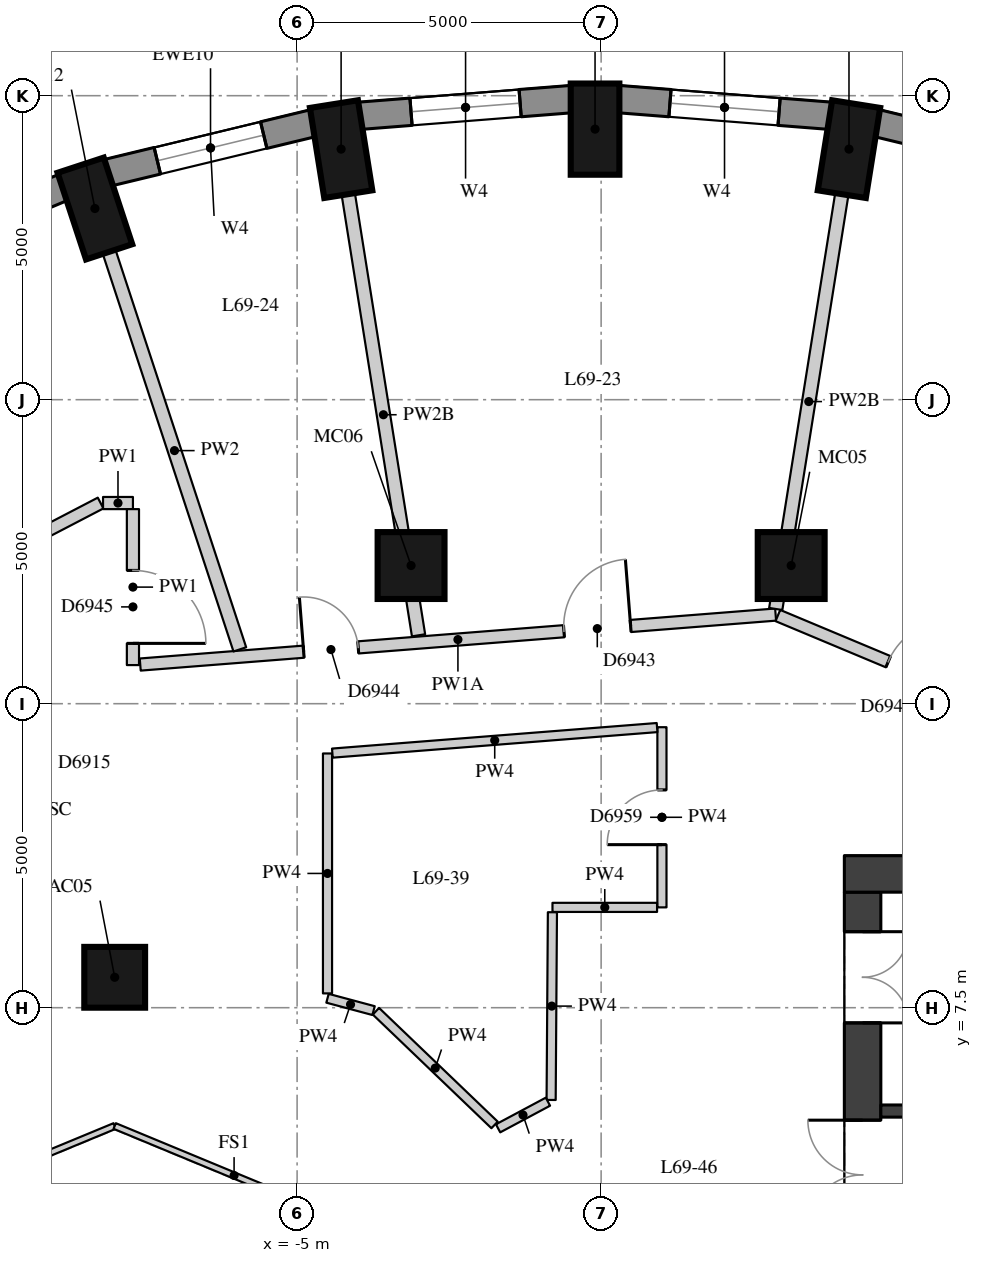
"""IFC4 building model, lengths in metres.
Left out: names, types, materials, properties, quantities, classifications, styles, units other than length and angle.
Written with IfcOpenShell. Run it as: python <this file> out.ifc"""

import sys

from ifc_helpers import new_model, si_unit, direction, frame, frame_2d, origin, origin_2d, place, context, subcontext, project, spatial, rectangle, extrude, element, fill, save


model = new_model("IFC4")
c1 = context("Model", 3, precision=1e-05, world=origin(), true_north=direction((0.0, 1.0)))
c2 = subcontext(c1, "Body", "Model", "MODEL_VIEW")
j1 = project(units=[si_unit("LENGTHUNIT", "METRE"), si_unit("PLANEANGLEUNIT", "RADIAN")], contexts=[c1])
p1 = place(None, origin())
s1 = spatial("IfcSite", under=j1, at=p1, CompositionType="ELEMENT")
p2 = place(p1, origin())
s2 = spatial("IfcBuilding", under=s1, at=p2, CompositionType="ELEMENT")
p3 = place(p2, frame((0.0, 0.0, 243.2)))
s3 = spatial("IfcBuildingStorey", under=s2, at=p3, CompositionType="ELEMENT", Elevation=243.2)
for number, where, z_axis, x_axis in (
    (1, (4.076, 21.621, 0.0), (0.0, 0.0, 1.0), (0.157, 0.988, 0.0)),
    (2, (-0.1, 21.95, 0.0), (0.0, 0.0, 1.0), (0.0, 1.0, 0.0)),
    (3, (-4.276, 21.621, 0.0), (0.0, 0.0, 1.0), (-0.157, 0.988, 0.0)),
    (4, (-8.326, 20.644, 0.0), (0.0, 0.0, 1.0), (-0.312, 0.95, 0.0)),
):
    element("IfcColumn", number, at=place(p3, frame(where, z_axis=z_axis, x_axis=x_axis)), inside=s3, PredefinedType="COLUMN", context=c2, shape_type="SweptSolid", body=[
        extrude(rectangle(XDim=1.5, YDim=0.8, at=origin_2d()), origin(), (0.0, 0.0, 1.0), 3.3),
    ])
p4 = place(p3, frame((-8.0, 8.0, 0.0), z_axis=(0.0, 0.0, 1.0), x_axis=(1.0, 0.0, 0.0)))
e5 = element("IfcColumn", 5, at=p4, inside=s3, PredefinedType="COLUMN", context=c2, shape_type="SweptSolid", body=[
    extrude(rectangle(XDim=1.0, YDim=1.0, at=origin_2d()), origin(), (0.0, 0.0, 1.0), 3.3),
])
for number, where, z_axis, x_axis in (
    (6, (3.126, 14.772, 0.0), (0.0, 0.0, 1.0), (1.0, 0.0, 0.0)),
    (7, (-3.126, 14.772, 0.0), (0.0, 0.0, 1.0), (1.0, 0.0, 0.0)),
):
    element("IfcColumn", number, at=place(p3, frame(where, z_axis=z_axis, x_axis=x_axis)), inside=s3, PredefinedType="COLUMN", context=c2, shape_type="SweptSolid", body=[
        extrude(rectangle(XDim=1.1, YDim=1.1, at=origin_2d()), origin(), (0.0, 0.0, 1.0), 3.3),
    ])
p5 = place(p3, frame((7.919, 21.232, 0.0), z_axis=(0.0, 0.0, 1.0), x_axis=(-0.972099278496, 0.23456980357, 0.0)))
e8 = element("IfcWall", 8, at=p5, inside=s3, PredefinedType="SOLIDWALL", context=c2, shape_type="SweptSolid", body=[
    extrude(rectangle(XDim=3.487, YDim=0.45, at=frame_2d((1.743, 0.0))), origin(), (0.0, 0.0, 1.0), 3.02),
])
p6 = place(p5, frame((0.843, 0.0, 0.4)))
e9 = element("IfcOpeningElement", 9, at=p6, cuts=e8, PredefinedType="OPENING", context=c2, shape_type="SweptSolid", body=[
    extrude(rectangle(XDim=1.8, YDim=1.75, at=frame_2d((0.9, 0.875))), frame((0.0, 0.235, 0.0), z_axis=(0.0, -1.0, 0.0), x_axis=(1.0, 0.0, 0.0)), (0.0, 0.0, 1.0), 0.47),
])
p7 = place(p3, frame((3.779, 22.169, 0.0), z_axis=(0.0, 0.0, 1.0), x_axis=(-0.996910775835, 0.078542377245, 0.0)))
e10 = element("IfcWall", 10, at=p7, inside=s3, PredefinedType="SOLIDWALL", context=c2, shape_type="SweptSolid", body=[
    extrude(rectangle(XDim=3.509, YDim=0.45, at=frame_2d((1.755, 0.0))), origin(), (0.0, 0.0, 1.0), 3.02),
])
p8 = place(p7, frame((0.855, 0.0, 0.4)))
e11 = element("IfcOpeningElement", 11, at=p8, cuts=e10, PredefinedType="OPENING", context=c2, shape_type="SweptSolid", body=[
    extrude(rectangle(XDim=1.8, YDim=1.75, at=frame_2d((0.9, 0.875))), frame((0.0, 0.235, 0.0), z_axis=(0.0, -1.0, 0.0), x_axis=(1.0, 0.0, 0.0)), (0.0, 0.0, 1.0), 0.47),
])
p9 = place(p3, frame((-0.48, 22.444, 0.0), z_axis=(0.0, 0.0, 1.0), x_axis=(-0.996910775835, -0.078542377245, 0.0)))
e12 = element("IfcWall", 12, at=p9, inside=s3, PredefinedType="SOLIDWALL", context=c2, shape_type="SweptSolid", body=[
    extrude(rectangle(XDim=3.509, YDim=0.45, at=frame_2d((1.755, 0.0))), origin(), (0.0, 0.0, 1.0), 3.02),
])
p10 = place(p9, frame((0.855, 0.0, 0.4)))
e13 = element("IfcOpeningElement", 13, at=p10, cuts=e12, PredefinedType="OPENING", context=c2, shape_type="SweptSolid", body=[
    extrude(rectangle(XDim=1.8, YDim=1.75, at=frame_2d((0.9, 0.875))), frame((0.0, 0.235, 0.0), z_axis=(0.0, -1.0, 0.0), x_axis=(1.0, 0.0, 0.0)), (0.0, 0.0, 1.0), 0.47),
])
p11 = place(p3, frame((-4.729, 22.05, 0.0), z_axis=(0.0, 0.0, 1.0), x_axis=(-0.972099278496, -0.23456980357, 0.0)))
e14 = element("IfcWall", 14, at=p11, inside=s3, PredefinedType="SOLIDWALL", context=c2, shape_type="SweptSolid", body=[
    extrude(rectangle(XDim=3.487, YDim=0.45, at=frame_2d((1.743, 0.0))), origin(), (0.0, 0.0, 1.0), 3.02),
])
p12 = place(p11, frame((0.843, 0.0, 0.4)))
e15 = element("IfcOpeningElement", 15, at=p12, cuts=e14, PredefinedType="OPENING", context=c2, shape_type="SweptSolid", body=[
    extrude(rectangle(XDim=1.8, YDim=1.75, at=frame_2d((0.9, 0.875))), frame((0.0, 0.235, 0.0), z_axis=(0.0, -1.0, 0.0), x_axis=(1.0, 0.0, 0.0)), (0.0, 0.0, 1.0), 0.47),
])
p13 = place(p3, frame((-8.841, 20.995, 0.0), z_axis=(0.0, 0.0, 1.0), x_axis=(-0.922024627475, -0.387131226239, 0.0)))
e16 = element("IfcWall", 16, at=p13, inside=s3, PredefinedType="SOLIDWALL", context=c2, shape_type="SweptSolid", body=[
    extrude(rectangle(XDim=3.443, YDim=0.45, at=frame_2d((1.722, 0.0))), origin(), (0.0, 0.0, 1.0), 3.02),
])
p14 = place(p13, frame((0.822, 0.0, 0.4)))
e17 = element("IfcOpeningElement", 17, at=p14, cuts=e16, PredefinedType="OPENING", context=c2, shape_type="SweptSolid", body=[
    extrude(rectangle(XDim=1.8, YDim=1.75, at=frame_2d((0.9, 0.875))), frame((0.0, 0.235, 0.0), z_axis=(0.0, -1.0, 0.0), x_axis=(1.0, 0.0, 0.0)), (0.0, 0.0, 1.0), 0.47),
])
p15 = place(p3, frame((4.3, -9.4, 0.0), z_axis=(0.0, 0.0, 1.0), x_axis=(0.0, 1.0, 0.0)))
e18 = element("IfcWall", 18, at=p15, inside=s3, PredefinedType="SHEAR", context=c2, shape_type="SweptSolid", body=[
    extrude(rectangle(XDim=18.8, YDim=0.6, at=frame_2d((9.4, 0.0))), origin(), (0.0, 0.0, 1.0), 3.02),
])
p16 = place(p15, frame((0.65, 0.0, 0.0)))
e19 = element("IfcOpeningElement", 19, at=p16, cuts=e18, PredefinedType="OPENING", context=c2, shape_type="SweptSolid", body=[
    extrude(rectangle(XDim=1.5, YDim=2.1, at=frame_2d((0.75, 1.05))), frame((0.0, 0.31, 0.0), z_axis=(0.0, -1.0, 0.0), x_axis=(1.0, 0.0, 0.0)), (0.0, 0.0, 1.0), 0.62),
])
p17 = place(p15, frame((3.75, 0.0, 0.0)))
e20 = element("IfcOpeningElement", 20, at=p17, cuts=e18, PredefinedType="OPENING", context=c2, shape_type="SweptSolid", body=[
    extrude(rectangle(XDim=1.8, YDim=2.1, at=frame_2d((0.9, 1.05))), frame((0.0, 0.31, 0.0), z_axis=(0.0, -1.0, 0.0), x_axis=(1.0, 0.0, 0.0)), (0.0, 0.0, 1.0), 0.62),
])
p18 = place(p15, frame((6.25, 0.0, 0.0)))
e21 = element("IfcOpeningElement", 21, at=p18, cuts=e18, PredefinedType="OPENING", context=c2, shape_type="SweptSolid", body=[
    extrude(rectangle(XDim=1.1, YDim=2.1, at=frame_2d((0.55, 1.05))), frame((0.0, 0.31, 0.0), z_axis=(0.0, -1.0, 0.0), x_axis=(1.0, 0.0, 0.0)), (0.0, 0.0, 1.0), 0.62),
])
p19 = place(p15, frame((8.9, 0.0, 0.0)))
e22 = element("IfcOpeningElement", 22, at=p19, cuts=e18, PredefinedType="OPENING", context=c2, shape_type="SweptSolid", body=[
    extrude(rectangle(XDim=1.0, YDim=2.1, at=frame_2d((0.5, 1.05))), frame((0.0, 0.31, 0.0), z_axis=(0.0, -1.0, 0.0), x_axis=(1.0, 0.0, 0.0)), (0.0, 0.0, 1.0), 0.62),
])
p20 = place(p15, frame((11.45, 0.0, 0.0)))
e23 = element("IfcOpeningElement", 23, at=p20, cuts=e18, PredefinedType="OPENING", context=c2, shape_type="SweptSolid", body=[
    extrude(rectangle(XDim=1.1, YDim=2.1, at=frame_2d((0.55, 1.05))), frame((0.0, 0.31, 0.0), z_axis=(0.0, -1.0, 0.0), x_axis=(1.0, 0.0, 0.0)), (0.0, 0.0, 1.0), 0.62),
])
p21 = place(p15, frame((13.25, 0.0, 0.0)))
e24 = element("IfcOpeningElement", 24, at=p21, cuts=e18, PredefinedType="OPENING", context=c2, shape_type="SweptSolid", body=[
    extrude(rectangle(XDim=1.8, YDim=2.1, at=frame_2d((0.9, 1.05))), frame((0.0, 0.31, 0.0), z_axis=(0.0, -1.0, 0.0), x_axis=(1.0, 0.0, 0.0)), (0.0, 0.0, 1.0), 0.62),
])
p22 = place(p15, frame((16.65, 0.0, 0.0)))
e25 = element("IfcOpeningElement", 25, at=p22, cuts=e18, PredefinedType="OPENING", context=c2, shape_type="SweptSolid", body=[
    extrude(rectangle(XDim=1.5, YDim=2.1, at=frame_2d((0.75, 1.05))), frame((0.0, 0.31, 0.0), z_axis=(0.0, -1.0, 0.0), x_axis=(1.0, 0.0, 0.0)), (0.0, 0.0, 1.0), 0.62),
])
p23 = place(p3, frame((4.0, 9.7, 0.0), z_axis=(0.0, 0.0, 1.0), x_axis=(1.0, 0.0, 0.0)))
e26 = element("IfcWall", 26, at=p23, inside=s3, PredefinedType="SHEAR", context=c2, shape_type="SweptSolid", body=[
    extrude(rectangle(XDim=12.0, YDim=0.6, at=frame_2d((6.0, 0.0))), origin(), (0.0, 0.0, 1.0), 3.02),
])
p24 = place(p3, frame((4.6, 5.8, 0.0), z_axis=(0.0, 0.0, 1.0), x_axis=(1.0, 0.0, 0.0)))
e27 = element("IfcWall", 27, at=p24, inside=s3, PredefinedType="SHEAR", context=c2, shape_type="SweptSolid", body=[
    extrude(rectangle(XDim=10.8, YDim=0.2, at=frame_2d((5.4, 0.0))), origin(), (0.0, 0.0, 1.0), 3.02),
])
p25 = place(p24, frame((7.05, 0.0, 0.0)))
e28 = element("IfcOpeningElement", 28, at=p25, cuts=e27, PredefinedType="OPENING", context=c2, shape_type="SweptSolid", body=[
    extrude(rectangle(XDim=1.1, YDim=2.1, at=frame_2d((0.55, 1.05))), frame((0.0, 0.11, 0.0), z_axis=(0.0, -1.0, 0.0), x_axis=(1.0, 0.0, 0.0)), (0.0, 0.0, 1.0), 0.22),
])
p26 = place(p24, frame((9.05, 0.0, 0.0)))
e29 = element("IfcOpeningElement", 29, at=p26, cuts=e27, PredefinedType="OPENING", context=c2, shape_type="SweptSolid", body=[
    extrude(rectangle(XDim=1.1, YDim=2.1, at=frame_2d((0.55, 1.05))), frame((0.0, 0.11, 0.0), z_axis=(0.0, -1.0, 0.0), x_axis=(1.0, 0.0, 0.0)), (0.0, 0.0, 1.0), 0.22),
])
p27 = place(p3, frame((-11.534, 14.081, 0.0), z_axis=(0.0, 0.0, 1.0), x_axis=(0.886975089277, 0.461817270143, 0.0)))
e30 = element("IfcWall", 30, at=p27, inside=s3, PredefinedType="PARTITIONING", context=c2, shape_type="SweptSolid", body=[
    extrude(rectangle(XDim=3.723, YDim=0.2, at=frame_2d((1.861, 0.0))), origin(), (0.0, 0.0, 1.0), 3.02),
])
p28 = place(p3, frame((-8.192, 15.8, 0.0), z_axis=(0.0, 0.0, 1.0), x_axis=(1.0, 0.0, 0.0)))
e31 = element("IfcWall", 31, at=p28, inside=s3, PredefinedType="PARTITIONING", context=c2, shape_type="SweptSolid", body=[
    extrude(rectangle(XDim=0.492, YDim=0.2, at=frame_2d((0.246, 0.0))), origin(), (0.0, 0.0, 1.0), 3.02),
])
p29 = place(p3, frame((-7.7, 15.7, 0.0), z_axis=(0.0, 0.0, 1.0), x_axis=(0.0, -1.0, 0.0)))
e32 = element("IfcWall", 32, at=p29, inside=s3, PredefinedType="PARTITIONING", context=c2, shape_type="SweptSolid", body=[
    extrude(rectangle(XDim=2.565, YDim=0.2, at=frame_2d((1.282, 0.0))), origin(), (0.0, 0.0, 1.0), 3.02),
])
p30 = place(p29, frame((1.008, 0.0, 0.0)))
e33 = element("IfcOpeningElement", 33, at=p30, cuts=e32, PredefinedType="OPENING", context=c2, shape_type="SweptSolid", body=[
    extrude(rectangle(XDim=1.2, YDim=2.1, at=frame_2d((0.6, 1.05))), frame((0.0, 0.11, 0.0), z_axis=(0.0, -1.0, 0.0), x_axis=(1.0, 0.0, 0.0)), (0.0, 0.0, 1.0), 0.22),
])
p31 = place(p3, frame((-7.58, 13.144, 0.0), z_axis=(0.0, 0.0, 1.0), x_axis=(0.996921908045, 0.078400951905, 0.0)))
e34 = element("IfcWall", 34, at=p31, inside=s3, PredefinedType="PARTITIONING", context=c2, shape_type="SweptSolid", body=[
    extrude(rectangle(XDim=10.482, YDim=0.2, at=frame_2d((5.241, 0.0))), origin(), (0.0, 0.0, 1.0), 2.57),
])
p32 = place(p31, frame((6.99, 0.0, 0.0)))
e35 = element("IfcOpeningElement", 35, at=p32, cuts=e34, PredefinedType="OPENING", context=c2, shape_type="SweptSolid", body=[
    extrude(rectangle(XDim=1.1, YDim=2.1, at=frame_2d((0.55, 1.05))), frame((0.0, 0.11, 0.0), z_axis=(0.0, -1.0, 0.0), x_axis=(1.0, 0.0, 0.0)), (0.0, 0.0, 1.0), 0.22),
])
p33 = place(p31, frame((2.696, 0.0, 0.0)))
e36 = element("IfcOpeningElement", 36, at=p33, cuts=e34, PredefinedType="OPENING", context=c2, shape_type="SweptSolid", body=[
    extrude(rectangle(XDim=0.9, YDim=2.1, at=frame_2d((0.45, 1.05))), frame((0.0, 0.11, 0.0), z_axis=(0.0, -1.0, 0.0), x_axis=(1.0, 0.0, 0.0)), (0.0, 0.0, 1.0), 0.22),
])
p34 = place(p3, frame((2.907, 13.95, 0.0), z_axis=(0.0, 0.0, 1.0), x_axis=(0.922453481254, -0.386108242494, 0.0)))
e37 = element("IfcWall", 37, at=p34, inside=s3, PredefinedType="PARTITIONING", context=c2, shape_type="SweptSolid", body=[
    extrude(rectangle(XDim=5.827, YDim=0.2, at=frame_2d((2.914, 0.0))), origin(), (0.0, 0.0, 1.0), 3.02),
])
p35 = place(p34, frame((1.968, 0.0, 0.0)))
e38 = element("IfcOpeningElement", 38, at=p35, cuts=e37, PredefinedType="OPENING", context=c2, shape_type="SweptSolid", body=[
    extrude(rectangle(XDim=1.1, YDim=2.1, at=frame_2d((0.55, 1.05))), frame((0.0, 0.11, 0.0), z_axis=(0.0, -1.0, 0.0), x_axis=(1.0, 0.0, 0.0)), (0.0, 0.0, 1.0), 0.22),
])
p36 = place(p3, frame((1.0, 12.113, 0.0), z_axis=(0.0, 0.0, 1.0), x_axis=(0.0, -1.0, 0.0)))
e39 = element("IfcWall", 39, at=p36, inside=s3, PredefinedType="PARTITIONING", context=c2, shape_type="SweptSolid", body=[
    extrude(rectangle(XDim=2.963, YDim=0.15, at=frame_2d((1.482, 0.0))), origin(), (0.0, 0.0, 1.0), 3.02),
])
p37 = place(p36, frame((1.032, 0.0, 0.0)))
e40 = element("IfcOpeningElement", 40, at=p37, cuts=e39, PredefinedType="OPENING", context=c2, shape_type="SweptSolid", body=[
    extrude(rectangle(XDim=0.9, YDim=2.1, at=frame_2d((0.45, 1.05))), frame((0.0, 0.085, 0.0), z_axis=(0.0, -1.0, 0.0), x_axis=(1.0, 0.0, 0.0)), (0.0, 0.0, 1.0), 0.17),
])
p38 = place(p3, frame((0.92, 9.15, 0.0), z_axis=(0.0, 0.0, 1.0), x_axis=(-1.0, 0.0, 0.0)))
e41 = element("IfcWall", 41, at=p38, inside=s3, PredefinedType="PARTITIONING", context=c2, shape_type="SweptSolid", body=[
    extrude(rectangle(XDim=1.72, YDim=0.15, at=frame_2d((0.86, 0.0))), origin(), (0.0, 0.0, 1.0), 3.02),
])
p39 = place(p3, frame((-0.801, 9.07, 0.0), z_axis=(0.0, 0.0, 1.0), x_axis=(-0.006879482938, -0.999976336077, 0.0)))
e42 = element("IfcWall", 42, at=p39, inside=s3, PredefinedType="PARTITIONING", context=c2, shape_type="SweptSolid", body=[
    extrude(rectangle(XDim=3.087, YDim=0.15, at=frame_2d((1.544, 0.0))), origin(), (0.0, 0.0, 1.0), 3.02),
])
p40 = place(p3, frame((-0.875, 5.954, 0.0), z_axis=(0.0, 0.0, 1.0), x_axis=(-0.882018256262, -0.471215232798, 0.0)))
e43 = element("IfcWall", 43, at=p40, inside=s3, PredefinedType="PARTITIONING", context=c2, shape_type="SweptSolid", body=[
    extrude(rectangle(XDim=0.929, YDim=0.15, at=frame_2d((0.465, 0.0))), origin(), (0.0, 0.0, 1.0), 3.02),
])
p41 = place(p3, frame((-1.752, 5.572, 0.0), z_axis=(0.0, 0.0, 1.0), x_axis=(-0.721943077846, 0.691952449487, 0.0)))
e44 = element("IfcWall", 44, at=p41, inside=s3, PredefinedType="PARTITIONING", context=c2, shape_type="SweptSolid", body=[
    extrude(rectangle(XDim=2.703, YDim=0.15, at=frame_2d((1.351, 0.0))), origin(), (0.0, 0.0, 1.0), 3.02),
])
p42 = place(p3, frame((-3.742, 7.452, 0.0), z_axis=(0.0, 0.0, 1.0), x_axis=(-0.965903596155, 0.258901994846, 0.0)))
e45 = element("IfcWall", 45, at=p42, inside=s3, PredefinedType="PARTITIONING", context=c2, shape_type="SweptSolid", body=[
    extrude(rectangle(XDim=0.785, YDim=0.15, at=frame_2d((0.392, 0.0))), origin(), (0.0, 0.0, 1.0), 3.02),
])
p43 = place(p3, frame((-4.5, 7.735, 0.0), z_axis=(0.0, 0.0, 1.0), x_axis=(0.0, 1.0, 0.0)))
e46 = element("IfcWall", 46, at=p43, inside=s3, PredefinedType="PARTITIONING", context=c2, shape_type="SweptSolid", body=[
    extrude(rectangle(XDim=3.946, YDim=0.15, at=frame_2d((1.973, 0.0))), origin(), (0.0, 0.0, 1.0), 3.02),
])
p44 = place(p3, frame((-4.42, 11.687, 0.0), z_axis=(0.0, 0.0, 1.0), x_axis=(0.996915064954, 0.078487917971, 0.0)))
e47 = element("IfcWall", 47, at=p44, inside=s3, PredefinedType="PARTITIONING", context=c2, shape_type="SweptSolid", body=[
    extrude(rectangle(XDim=5.356, YDim=0.15, at=frame_2d((2.678, 0.0))), origin(), (0.0, 0.0, 1.0), 3.02),
])
p45 = place(p3, frame((3.958, 20.88, 0.0), z_axis=(0.0, 0.0, 1.0), x_axis=(-0.157259964952, -0.987557240581, 0.0)))
e48 = element("IfcWall", 48, at=p45, inside=s3, PredefinedType="PARTITIONING", context=c2, shape_type="SweptSolid", body=[
    extrude(rectangle(XDim=6.908, YDim=0.22, at=frame_2d((3.454, 0.0))), origin(), (0.0, 0.0, 1.0), 2.57),
])
p46 = place(p3, frame((-4.158, 20.88, 0.0), z_axis=(0.0, 0.0, 1.0), x_axis=(0.157271196312, -0.987555452018, 0.0)))
e49 = element("IfcWall", 49, at=p46, inside=s3, PredefinedType="PARTITIONING", context=c2, shape_type="SweptSolid", body=[
    extrude(rectangle(XDim=7.347, YDim=0.22, at=frame_2d((3.674, 0.0))), origin(), (0.0, 0.0, 1.0), 2.57),
])
p47 = place(p3, frame((-8.091, 19.932, 0.0), z_axis=(0.0, 0.0, 1.0), x_axis=(0.312277225251, -0.949991018162, 0.0)))
e50 = element("IfcWall", 50, at=p47, inside=s3, PredefinedType="PARTITIONING", context=c2, shape_type="SweptSolid", body=[
    extrude(rectangle(XDim=6.883, YDim=0.22, at=frame_2d((3.441, 0.0))), origin(), (0.0, 0.0, 1.0), 3.02),
])
for number, where, z_axis, x_axis in (
    (51, (-11.927, 3.927, 0.0), (0.0, 0.0, 1.0), (0.924, 0.383, 0.0)),
    (52, (-8.0, 5.554, 0.0), (0.0, 0.0, 1.0), (0.924, -0.383, 0.0)),
):
    element("IfcWall", number, at=place(p3, frame(where, z_axis=z_axis, x_axis=x_axis)), inside=s3, PredefinedType="PARTITIONING", context=c2, shape_type="SweptSolid", body=[
        extrude(rectangle(XDim=4.251, YDim=0.1, at=frame_2d((2.125, 0.0))), origin(), (0.0, 0.0, 1.0), 3.02),
    ])
p48 = place(p8, origin())
e53 = element("IfcWindow", 53, at=p48, inside=s3, PartitioningType="SINGLE_PANEL", PredefinedType="WINDOW", context=c2, shape_type="SweptSolid", body=[
    extrude(rectangle(XDim=1.8, YDim=1.75, at=frame_2d((0.9, 0.875))), frame((0.0, 0.035, 0.0), z_axis=(0.0, -1.0, 0.0), x_axis=(1.0, 0.0, 0.0)), (0.0, 0.0, 1.0), 0.06),
])
fill(e11, e53)
p49 = place(p10, origin())
e54 = element("IfcWindow", 54, at=p49, inside=s3, PartitioningType="SINGLE_PANEL", PredefinedType="WINDOW", context=c2, shape_type="SweptSolid", body=[
    extrude(rectangle(XDim=1.8, YDim=1.75, at=frame_2d((0.9, 0.875))), frame((0.0, 0.035, 0.0), z_axis=(0.0, -1.0, 0.0), x_axis=(1.0, 0.0, 0.0)), (0.0, 0.0, 1.0), 0.06),
])
fill(e13, e54)
p50 = place(p12, origin())
e55 = element("IfcWindow", 55, at=p50, inside=s3, PartitioningType="SINGLE_PANEL", PredefinedType="WINDOW", context=c2, shape_type="SweptSolid", body=[
    extrude(rectangle(XDim=1.8, YDim=1.75, at=frame_2d((0.9, 0.875))), frame((0.0, 0.035, 0.0), z_axis=(0.0, -1.0, 0.0), x_axis=(1.0, 0.0, 0.0)), (0.0, 0.0, 1.0), 0.06),
])
fill(e15, e55)
p51 = place(p21, origin())
e56 = element("IfcDoor", 56, at=p51, inside=s3, OperationType="DOUBLE_DOOR_SINGLE_SWING", PredefinedType="DOOR", context=c2, shape_type="SweptSolid", body=[
    extrude(rectangle(XDim=1.8, YDim=2.1, at=frame_2d((0.9, 1.05))), frame((0.0, 0.025, 0.0), z_axis=(0.0, -1.0, 0.0), x_axis=(1.0, 0.0, 0.0)), (0.0, 0.0, 1.0), 0.05),
])
fill(e24, e56)
p52 = place(p22, origin())
e57 = element("IfcDoor", 57, at=p52, inside=s3, OperationType="DOUBLE_DOOR_SINGLE_SWING", PredefinedType="DOOR", context=c2, shape_type="SweptSolid", body=[
    extrude(rectangle(XDim=1.5, YDim=2.1, at=frame_2d((0.75, 1.05))), frame((0.0, 0.025, 0.0), z_axis=(0.0, -1.0, 0.0), x_axis=(1.0, 0.0, 0.0)), (0.0, 0.0, 1.0), 0.05),
])
fill(e25, e57)
p53 = place(p35, origin())
e58 = element("IfcDoor", 58, at=p53, inside=s3, OperationType="SINGLE_SWING_RIGHT", PredefinedType="DOOR", context=c2, shape_type="SweptSolid", body=[
    extrude(rectangle(XDim=1.1, YDim=2.1, at=frame_2d((0.55, 1.05))), frame((0.0, 0.025, 0.0), z_axis=(0.0, -1.0, 0.0), x_axis=(1.0, 0.0, 0.0)), (0.0, 0.0, 1.0), 0.05),
])
fill(e38, e58)
p54 = place(p32, origin())
e59 = element("IfcDoor", 59, at=p54, inside=s3, OperationType="SINGLE_SWING_RIGHT", PredefinedType="DOOR", context=c2, shape_type="SweptSolid", body=[
    extrude(rectangle(XDim=1.1, YDim=2.1, at=frame_2d((0.55, 1.05))), frame((0.0, 0.025, 0.0), z_axis=(0.0, -1.0, 0.0), x_axis=(1.0, 0.0, 0.0)), (0.0, 0.0, 1.0), 0.05),
])
fill(e35, e59)
p55 = place(p33, origin())
e60 = element("IfcDoor", 60, at=p55, inside=s3, OperationType="SINGLE_SWING_LEFT", PredefinedType="DOOR", context=c2, shape_type="SweptSolid", body=[
    extrude(rectangle(XDim=0.9, YDim=2.1, at=frame_2d((0.45, 1.05))), frame((0.0, 0.025, 0.0), z_axis=(0.0, -1.0, 0.0), x_axis=(1.0, 0.0, 0.0)), (0.0, 0.0, 1.0), 0.05),
])
fill(e36, e60)
p56 = place(p30, origin())
e61 = element("IfcDoor", 61, at=p56, inside=s3, OperationType="SINGLE_SWING_RIGHT", PredefinedType="DOOR", context=c2, shape_type="SweptSolid", body=[
    extrude(rectangle(XDim=1.2, YDim=2.1, at=frame_2d((0.6, 1.05))), frame((0.0, 0.025, 0.0), z_axis=(0.0, -1.0, 0.0), x_axis=(1.0, 0.0, 0.0)), (0.0, 0.0, 1.0), 0.05),
])
fill(e33, e61)
p57 = place(p37, origin())
e62 = element("IfcDoor", 62, at=p57, inside=s3, OperationType="SINGLE_SWING_LEFT", PredefinedType="DOOR", context=c2, shape_type="SweptSolid", body=[
    extrude(rectangle(XDim=0.9, YDim=2.1, at=frame_2d((0.45, 1.05))), frame((0.0, 0.025, 0.0), z_axis=(0.0, -1.0, 0.0), x_axis=(1.0, 0.0, 0.0)), (0.0, 0.0, 1.0), 0.05),
])
fill(e40, e62)
save(model, sys.argv[1])
